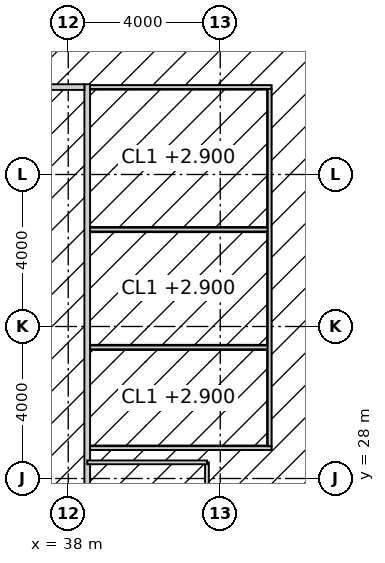
"""IFC4 building model, lengths in metres.
Left out: names, types, materials, properties, quantities, classifications, styles, units other than length and angle.
Written with IfcOpenShell. Run it as: python <this file> out.ifc"""

import sys

from ifc_helpers import new_model, si_unit, direction, frame, frame_2d, origin, place, context, subcontext, project, spatial, rectangle, extrude, element, fill, save


model = new_model("IFC4")
c1 = context("Model", 3, precision=1e-05, world=origin(), true_north=direction((0.0, 1.0)))
c2 = subcontext(c1, "Body", "Model", "MODEL_VIEW")
j1 = project(units=[si_unit("LENGTHUNIT", "METRE"), si_unit("PLANEANGLEUNIT", "RADIAN")], contexts=[c1])
p1 = place(None, origin())
s1 = spatial("IfcSite", under=j1, at=p1, CompositionType="ELEMENT")
p2 = place(p1, origin())
s2 = spatial("IfcBuilding", under=s1, at=p2, CompositionType="ELEMENT")
p3 = place(p2, frame((0.0, 0.0, 286.2)))
s3 = spatial("IfcBuildingStorey", under=s2, at=p3, CompositionType="ELEMENT", Elevation=286.2)
p4 = place(p3, frame((38.5, 15.025, 0.0), z_axis=(0.0, 0.0, 1.0), x_axis=(0.0, 1.0, 0.0)))
e1 = element("IfcWall", 1, at=p4, inside=s3, PredefinedType="PARTITIONING", context=c2, shape_type="SweptSolid", body=[
    extrude(rectangle(XDim=23.35, YDim=0.15, at=frame_2d((11.675, 0.0))), origin(), (0.0, 0.0, 1.0), 3.85),
])
p5 = place(p4, frame((10.775, 0.0, 0.0)))
e2 = element("IfcOpeningElement", 2, at=p5, cuts=e1, PredefinedType="OPENING", context=c2, shape_type="SweptSolid", body=[
    extrude(rectangle(XDim=1.8, YDim=2.4, at=frame_2d((0.9, 1.2))), frame((0.0, 0.085, 0.0), z_axis=(0.0, -1.0, 0.0), x_axis=(1.0, 0.0, 0.0)), (0.0, 0.0, 1.0), 0.17),
])
p6 = place(p3, frame((15.775, 38.3, 0.0), z_axis=(0.0, 0.0, 1.0), x_axis=(1.0, 0.0, 0.0)))
e3 = element("IfcWall", 3, at=p6, inside=s3, PredefinedType="PARTITIONING", context=c2, shape_type="SweptSolid", body=[
    extrude(rectangle(XDim=22.65, YDim=0.15, at=frame_2d((11.325, 0.0))), origin(), (0.0, 0.0, 1.0), 3.85),
])
p7 = place(p6, frame((7.975, 0.0, 0.0)))
e4 = element("IfcOpeningElement", 4, at=p7, cuts=e3, PredefinedType="OPENING", context=c2, shape_type="SweptSolid", body=[
    extrude(rectangle(XDim=0.9, YDim=2.1, at=frame_2d((0.45, 1.05))), frame((0.0, 0.085, 0.0), z_axis=(0.0, -1.0, 0.0), x_axis=(1.0, 0.0, 0.0)), (0.0, 0.0, 1.0), 0.17),
])
p8 = place(p6, frame((11.725, 0.0, 0.0)))
e5 = element("IfcOpeningElement", 5, at=p8, cuts=e3, PredefinedType="OPENING", context=c2, shape_type="SweptSolid", body=[
    extrude(rectangle(XDim=1.0, YDim=2.1, at=frame_2d((0.5, 1.05))), frame((0.0, 0.085, 0.0), z_axis=(0.0, -1.0, 0.0), x_axis=(1.0, 0.0, 0.0)), (0.0, 0.0, 1.0), 0.17),
])
p9 = place(p6, frame((15.575, 0.0, 0.0)))
e6 = element("IfcOpeningElement", 6, at=p9, cuts=e3, PredefinedType="OPENING", context=c2, shape_type="SweptSolid", body=[
    extrude(rectangle(XDim=0.9, YDim=2.1, at=frame_2d((0.45, 1.05))), frame((0.0, 0.085, 0.0), z_axis=(0.0, -1.0, 0.0), x_axis=(1.0, 0.0, 0.0)), (0.0, 0.0, 1.0), 0.17),
])
p10 = place(p3, frame((38.575, 28.8, 0.0), z_axis=(0.0, 0.0, 1.0), x_axis=(1.0, 0.0, 0.0)))
e7 = element("IfcWall", 7, at=p10, inside=s3, PredefinedType="PARTITIONING", context=c2, shape_type="SweptSolid", body=[
    extrude(rectangle(XDim=4.775, YDim=0.1, at=frame_2d((2.388, 0.0))), origin(), (0.0, 0.0, 1.0), 3.85),
])
for number, where, z_axis, x_axis in (
    (8, (38.575, 31.45, 0.0), (0.0, 0.0, 1.0), (1.0, 0.0, 0.0)),
    (9, (38.575, 34.55, 0.0), (0.0, 0.0, 1.0), (1.0, 0.0, 0.0)),
):
    element("IfcWall", number, at=place(p3, frame(where, z_axis=z_axis, x_axis=x_axis)), inside=s3, PredefinedType="PARTITIONING", context=c2, shape_type="SweptSolid", body=[
        extrude(rectangle(XDim=4.675, YDim=0.1, at=frame_2d((2.337, 0.0))), origin(), (0.0, 0.0, 1.0), 3.85),
    ])
p11 = place(p3, frame((38.575, 38.3, 0.0), z_axis=(0.0, 0.0, 1.0), x_axis=(1.0, 0.0, 0.0)))
e10 = element("IfcWall", 10, at=p11, inside=s3, PredefinedType="PARTITIONING", context=c2, shape_type="SweptSolid", body=[
    extrude(rectangle(XDim=4.775, YDim=0.1, at=frame_2d((2.388, 0.0))), origin(), (0.0, 0.0, 1.0), 3.85),
])
p12 = place(p3, frame((43.3, 28.85, 0.0), z_axis=(0.0, 0.0, 1.0), x_axis=(0.0, 1.0, 0.0)))
e11 = element("IfcWall", 11, at=p12, inside=s3, PredefinedType="PARTITIONING", context=c2, shape_type="SweptSolid", body=[
    extrude(rectangle(XDim=9.4, YDim=0.1, at=frame_2d((4.7, 0.0))), origin(), (0.0, 0.0, 1.0), 3.85),
])
p13 = place(p12, frame((0.775, 0.0, 0.0)))
e12 = element("IfcOpeningElement", 12, at=p13, cuts=e11, PredefinedType="OPENING", context=c2, shape_type="SweptSolid", body=[
    extrude(rectangle(XDim=1.0, YDim=2.2, at=frame_2d((0.5, 1.1))), frame((0.0, 0.06, 0.0), z_axis=(0.0, -1.0, 0.0), x_axis=(1.0, 0.0, 0.0)), (0.0, 0.0, 1.0), 0.12),
])
p14 = place(p12, frame((3.65, 0.0, 0.0)))
e13 = element("IfcOpeningElement", 13, at=p14, cuts=e11, PredefinedType="OPENING", context=c2, shape_type="SweptSolid", body=[
    extrude(rectangle(XDim=1.0, YDim=2.2, at=frame_2d((0.5, 1.1))), frame((0.0, 0.06, 0.0), z_axis=(0.0, -1.0, 0.0), x_axis=(1.0, 0.0, 0.0)), (0.0, 0.0, 1.0), 0.12),
])
p15 = place(p12, frame((7.075, 0.0, 0.0)))
e14 = element("IfcOpeningElement", 14, at=p15, cuts=e11, PredefinedType="OPENING", context=c2, shape_type="SweptSolid", body=[
    extrude(rectangle(XDim=1.0, YDim=2.2, at=frame_2d((0.5, 1.1))), frame((0.0, 0.06, 0.0), z_axis=(0.0, -1.0, 0.0), x_axis=(1.0, 0.0, 0.0)), (0.0, 0.0, 1.0), 0.12),
])
p16 = place(p3, frame((41.65, 24.975, 0.0), z_axis=(0.0, 0.0, 1.0), x_axis=(0.0, 1.0, 0.0)))
e15 = element("IfcWall", 15, at=p16, inside=s3, PredefinedType="PARTITIONING", context=c2, shape_type="SweptSolid", body=[
    extrude(rectangle(XDim=3.45, YDim=0.1, at=frame_2d((1.725, 0.0))), origin(), (0.0, 0.0, 1.0), 3.85),
])
p17 = place(p16, frame((1.225, 0.0, 0.0)))
e16 = element("IfcOpeningElement", 16, at=p17, cuts=e15, PredefinedType="OPENING", context=c2, shape_type="SweptSolid", body=[
    extrude(rectangle(XDim=1.0, YDim=2.2, at=frame_2d((0.5, 1.1))), frame((0.0, 0.06, 0.0), z_axis=(0.0, -1.0, 0.0), x_axis=(1.0, 0.0, 0.0)), (0.0, 0.0, 1.0), 0.12),
])
p18 = place(p3, frame((41.65, 28.425, 0.0), z_axis=(0.0, 0.0, 1.0), x_axis=(-1.0, 0.0, 0.0)))
e17 = element("IfcWall", 17, at=p18, inside=s3, PredefinedType="PARTITIONING", context=c2, shape_type="SweptSolid", body=[
    extrude(rectangle(XDim=3.15, YDim=0.1, at=frame_2d((1.575, 0.0))), origin(), (0.0, 0.0, 1.0), 3.85),
])
p19 = place(p13, origin())
e18 = element("IfcDoor", 18, at=p19, inside=s3, OperationType="SINGLE_SWING_LEFT", PredefinedType="DOOR", context=c2, shape_type="SweptSolid", body=[
    extrude(rectangle(XDim=1.0, YDim=2.2, at=frame_2d((0.5, 1.1))), frame((0.0, 0.025, 0.0), z_axis=(0.0, -1.0, 0.0), x_axis=(1.0, 0.0, 0.0)), (0.0, 0.0, 1.0), 0.05),
])
fill(e12, e18)
p20 = place(p14, origin())
e19 = element("IfcDoor", 19, at=p20, inside=s3, OperationType="SINGLE_SWING_LEFT", PredefinedType="DOOR", context=c2, shape_type="SweptSolid", body=[
    extrude(rectangle(XDim=1.0, YDim=2.2, at=frame_2d((0.5, 1.1))), frame((0.0, 0.025, 0.0), z_axis=(0.0, -1.0, 0.0), x_axis=(1.0, 0.0, 0.0)), (0.0, 0.0, 1.0), 0.05),
])
fill(e13, e19)
p21 = place(p15, origin())
e20 = element("IfcDoor", 20, at=p21, inside=s3, OperationType="SINGLE_SWING_RIGHT", PredefinedType="DOOR", context=c2, shape_type="SweptSolid", body=[
    extrude(rectangle(XDim=1.0, YDim=2.2, at=frame_2d((0.5, 1.1))), frame((0.0, 0.025, 0.0), z_axis=(0.0, -1.0, 0.0), x_axis=(1.0, 0.0, 0.0)), (0.0, 0.0, 1.0), 0.05),
])
fill(e14, e20)
save(model, sys.argv[1])
